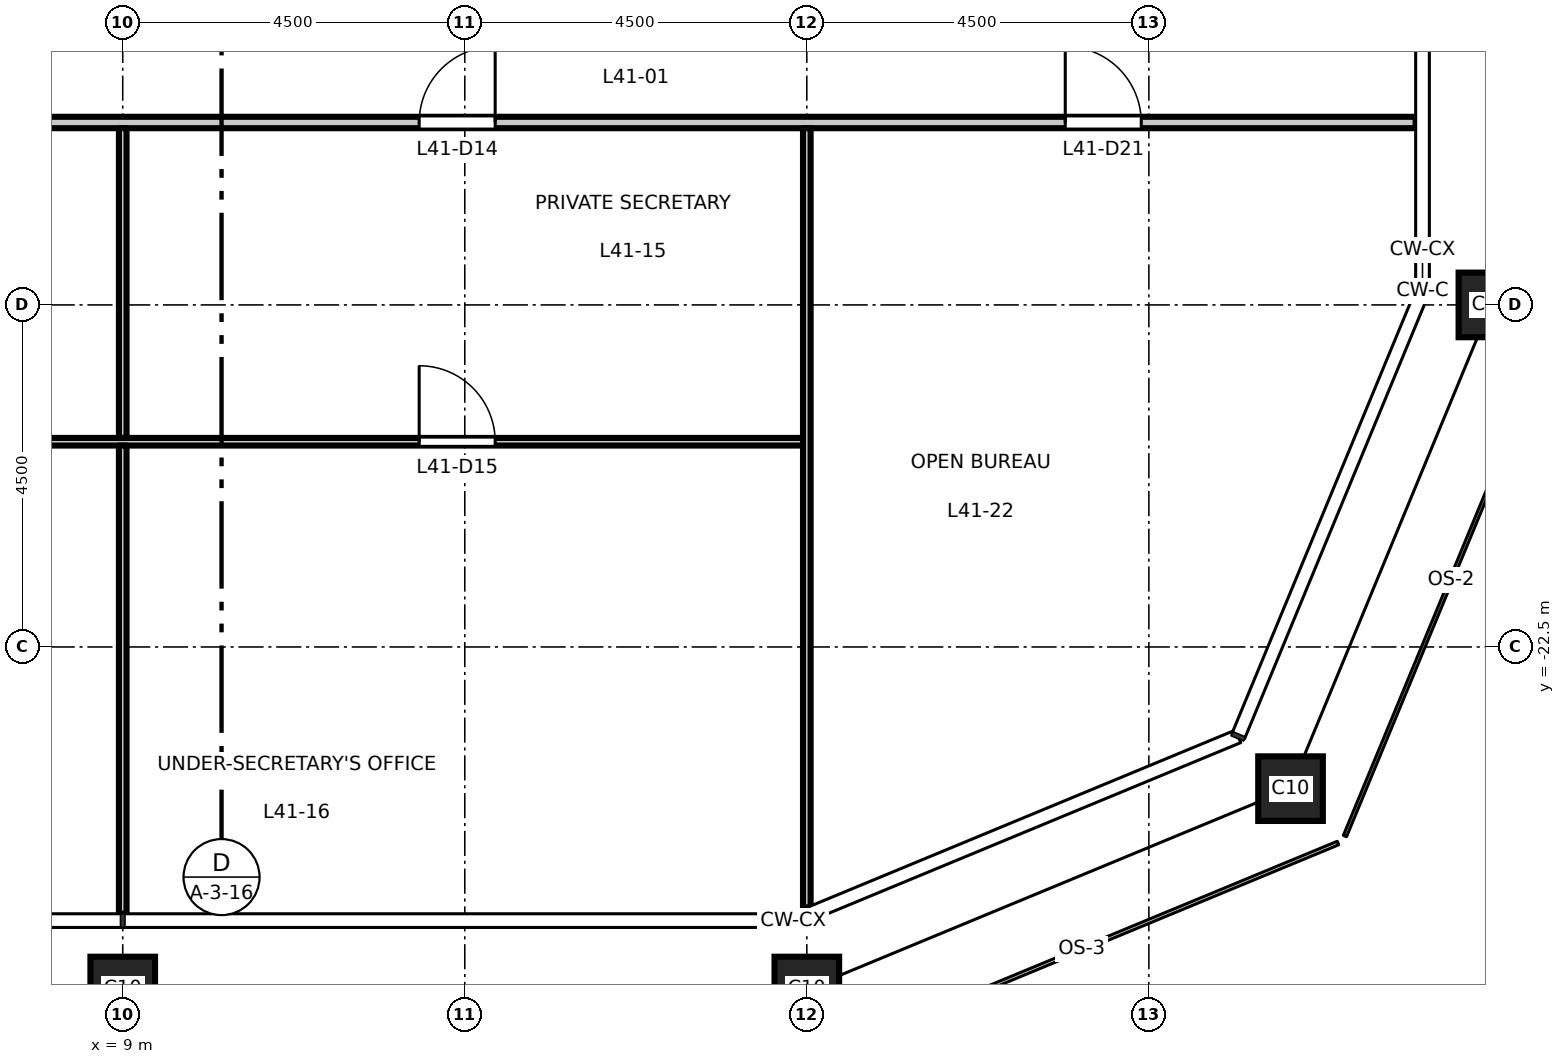
"""IFC4 building model, lengths in metres.
Left out: names, types, materials, properties, quantities, classifications, styles, units other than length and angle.
Written with IfcOpenShell. Run it as: python <this file> out.ifc"""

import sys

from ifc_helpers import new_model, si_unit, direction, frame, frame_2d, origin, origin_2d, place, context, subcontext, project, spatial, rectangle, hollow_rectangle, extrude, element, fill, save


model = new_model("IFC4")
c1 = context("Model", 3, precision=1e-05, world=origin(), true_north=direction((0.0, 1.0)))
c2 = subcontext(c1, "Body", "Model", "MODEL_VIEW")
j1 = project(units=[si_unit("LENGTHUNIT", "METRE"), si_unit("PLANEANGLEUNIT", "RADIAN")], contexts=[c1])
p1 = place(None, origin())
s1 = spatial("IfcSite", under=j1, at=p1, CompositionType="ELEMENT")
p2 = place(p1, origin())
s2 = spatial("IfcBuilding", under=s1, at=p2, CompositionType="ELEMENT")
p3 = place(p2, frame((0.0, 0.0, 192.7)))
s3 = spatial("IfcBuildingStorey", under=s2, at=p3, CompositionType="ELEMENT", Elevation=192.7)
for number, where, z_axis, x_axis in (
    (1, (9.0, -27.0, 0.0), (0.0, 0.0, 1.0), (1.0, 0.0, 0.0)),
    (2, (18.0, -27.0, 0.0), (0.0, 0.0, 1.0), (1.0, 0.0, 0.0)),
    (3, (24.364, -24.364, 0.0), (0.0, 0.0, 1.0), (1.0, 0.0, 0.0)),
    (4, (27.0, -18.0, 0.0), (0.0, 0.0, 1.0), (1.0, 0.0, 0.0)),
):
    element("IfcColumn", number, at=place(p3, frame(where, z_axis=z_axis, x_axis=x_axis)), inside=s3, PredefinedType="COLUMN", context=c2, shape_type="SweptSolid", body=[
        extrude(hollow_rectangle(XDim=0.85, YDim=0.85, WallThickness=0.05, at=origin_2d()), origin(), (0.0, 0.0, 1.0), 4.5),
    ])
p4 = place(p3, frame((0.05, -19.8, 0.0), z_axis=(0.0, 0.0, 1.0), x_axis=(1.0, 0.0, 0.0)))
e5 = element("IfcWall", 5, at=p4, inside=s3, PredefinedType="PARTITIONING", context=c2, shape_type="SweptSolid", body=[
    extrude(rectangle(XDim=17.9, YDim=0.1, at=frame_2d((8.95, 0.0))), origin(), (0.0, 0.0, 1.0), 4.35),
])
p5 = place(p4, frame((3.85, 0.0, 0.0)))
e6 = element("IfcOpeningElement", 6, at=p5, cuts=e5, PredefinedType="OPENING", context=c2, shape_type="SweptSolid", body=[
    extrude(rectangle(XDim=1.0, YDim=2.1, at=frame_2d((0.5, 1.05))), frame((0.0, 0.06, 0.0), z_axis=(0.0, -1.0, 0.0), x_axis=(1.0, 0.0, 0.0)), (0.0, 0.0, 1.0), 0.12),
])
p6 = place(p4, frame((12.85, 0.0, 0.0)))
e7 = element("IfcOpeningElement", 7, at=p6, cuts=e5, PredefinedType="OPENING", context=c2, shape_type="SweptSolid", body=[
    extrude(rectangle(XDim=1.0, YDim=2.1, at=frame_2d((0.5, 1.05))), frame((0.0, 0.06, 0.0), z_axis=(0.0, -1.0, 0.0), x_axis=(1.0, 0.0, 0.0)), (0.0, 0.0, 1.0), 0.12),
])
p7 = place(p3, frame((-26.01, -15.6, 0.0), z_axis=(0.0, 0.0, 1.0), x_axis=(1.0, 0.0, 0.0)))
e8 = element("IfcWall", 8, at=p7, inside=s3, PredefinedType="PARTITIONING", context=c2, shape_type="SweptSolid", body=[
    extrude(rectangle(XDim=52.02, YDim=0.15, at=frame_2d((26.01, 0.0))), origin(), (0.0, 0.0, 1.0), 4.35),
])
p8 = place(p7, frame((11.91, 0.0, 0.0)))
e9 = element("IfcOpeningElement", 9, at=p8, cuts=e8, PredefinedType="OPENING", context=c2, shape_type="SweptSolid", body=[
    extrude(rectangle(XDim=1.0, YDim=2.1, at=frame_2d((0.5, 1.05))), frame((0.0, 0.085, 0.0), z_axis=(0.0, -1.0, 0.0), x_axis=(1.0, 0.0, 0.0)), (0.0, 0.0, 1.0), 0.17),
])
p9 = place(p7, frame((20.91, 0.0, 0.0)))
e10 = element("IfcOpeningElement", 10, at=p9, cuts=e8, PredefinedType="OPENING", context=c2, shape_type="SweptSolid", body=[
    extrude(rectangle(XDim=1.0, YDim=2.1, at=frame_2d((0.5, 1.05))), frame((0.0, 0.085, 0.0), z_axis=(0.0, -1.0, 0.0), x_axis=(1.0, 0.0, 0.0)), (0.0, 0.0, 1.0), 0.17),
])
p10 = place(p7, frame((29.91, 0.0, 0.0)))
e11 = element("IfcOpeningElement", 11, at=p10, cuts=e8, PredefinedType="OPENING", context=c2, shape_type="SweptSolid", body=[
    extrude(rectangle(XDim=1.0, YDim=2.1, at=frame_2d((0.5, 1.05))), frame((0.0, 0.085, 0.0), z_axis=(0.0, -1.0, 0.0), x_axis=(1.0, 0.0, 0.0)), (0.0, 0.0, 1.0), 0.17),
])
p11 = place(p7, frame((38.91, 0.0, 0.0)))
e12 = element("IfcOpeningElement", 12, at=p11, cuts=e8, PredefinedType="OPENING", context=c2, shape_type="SweptSolid", body=[
    extrude(rectangle(XDim=1.0, YDim=2.1, at=frame_2d((0.5, 1.05))), frame((0.0, 0.085, 0.0), z_axis=(0.0, -1.0, 0.0), x_axis=(1.0, 0.0, 0.0)), (0.0, 0.0, 1.0), 0.17),
])
p12 = place(p7, frame((3.4, 0.0, 0.0)))
e13 = element("IfcOpeningElement", 13, at=p12, cuts=e8, PredefinedType="OPENING", context=c2, shape_type="SweptSolid", body=[
    extrude(rectangle(XDim=1.0, YDim=2.1, at=frame_2d((0.5, 1.05))), frame((0.0, 0.085, 0.0), z_axis=(0.0, -1.0, 0.0), x_axis=(1.0, 0.0, 0.0)), (0.0, 0.0, 1.0), 0.17),
])
p13 = place(p7, frame((47.41, 0.0, 0.0)))
e14 = element("IfcOpeningElement", 14, at=p13, cuts=e8, PredefinedType="OPENING", context=c2, shape_type="SweptSolid", body=[
    extrude(rectangle(XDim=1.0, YDim=2.1, at=frame_2d((0.5, 1.05))), frame((0.0, 0.085, 0.0), z_axis=(0.0, -1.0, 0.0), x_axis=(1.0, 0.0, 0.0)), (0.0, 0.0, 1.0), 0.17),
])
p14 = place(p3, frame((9.0, -26.01, 0.0), z_axis=(0.0, 0.0, 1.0), x_axis=(0.0, 1.0, 0.0)))
e15 = element("IfcWall", 15, at=p14, inside=s3, PredefinedType="PARTITIONING", context=c2, shape_type="SweptSolid", body=[
    extrude(rectangle(XDim=6.16, YDim=0.1, at=frame_2d((3.08, 0.0))), origin(), (0.0, 0.0, 1.0), 3.65),
])
p15 = place(p3, frame((9.0, -19.75, 0.0), z_axis=(0.0, 0.0, 1.0), x_axis=(0.0, 1.0, 0.0)))
e16 = element("IfcWall", 16, at=p15, inside=s3, PredefinedType="PARTITIONING", context=c2, shape_type="SweptSolid", body=[
    extrude(rectangle(XDim=4.075, YDim=0.1, at=frame_2d((2.038, 0.0))), origin(), (0.0, 0.0, 1.0), 3.65),
])
p16 = place(p3, frame((18.0, -25.928, 0.0), z_axis=(0.0, 0.0, 1.0), x_axis=(0.0, 1.0, 0.0)))
e17 = element("IfcWall", 17, at=p16, inside=s3, PredefinedType="PARTITIONING", context=c2, shape_type="SweptSolid", body=[
    extrude(rectangle(XDim=10.253, YDim=0.1, at=frame_2d((5.126, 0.0))), origin(), (0.0, 0.0, 1.0), 3.65),
])
p17 = place(p11, origin())
e18 = element("IfcDoor", 18, at=p17, inside=s3, OperationType="SINGLE_SWING_RIGHT", PredefinedType="DOOR", context=c2, shape_type="SweptSolid", body=[
    extrude(rectangle(XDim=1.0, YDim=2.1, at=frame_2d((0.5, 1.05))), frame((0.0, 0.025, 0.0), z_axis=(0.0, -1.0, 0.0), x_axis=(1.0, 0.0, 0.0)), (0.0, 0.0, 1.0), 0.05),
])
fill(e12, e18)
p18 = place(p6, origin())
e19 = element("IfcDoor", 19, at=p18, inside=s3, OperationType="SINGLE_SWING_LEFT", PredefinedType="DOOR", context=c2, shape_type="SweptSolid", body=[
    extrude(rectangle(XDim=1.0, YDim=2.1, at=frame_2d((0.5, 1.05))), frame((0.0, 0.025, 0.0), z_axis=(0.0, -1.0, 0.0), x_axis=(1.0, 0.0, 0.0)), (0.0, 0.0, 1.0), 0.05),
])
fill(e7, e19)
p19 = place(p13, origin())
e20 = element("IfcDoor", 20, at=p19, inside=s3, OperationType="SINGLE_SWING_LEFT", PredefinedType="DOOR", context=c2, shape_type="SweptSolid", body=[
    extrude(rectangle(XDim=1.0, YDim=2.1, at=frame_2d((0.5, 1.05))), frame((0.0, 0.025, 0.0), z_axis=(0.0, -1.0, 0.0), x_axis=(1.0, 0.0, 0.0)), (0.0, 0.0, 1.0), 0.05),
])
fill(e14, e20)
save(model, sys.argv[1])
